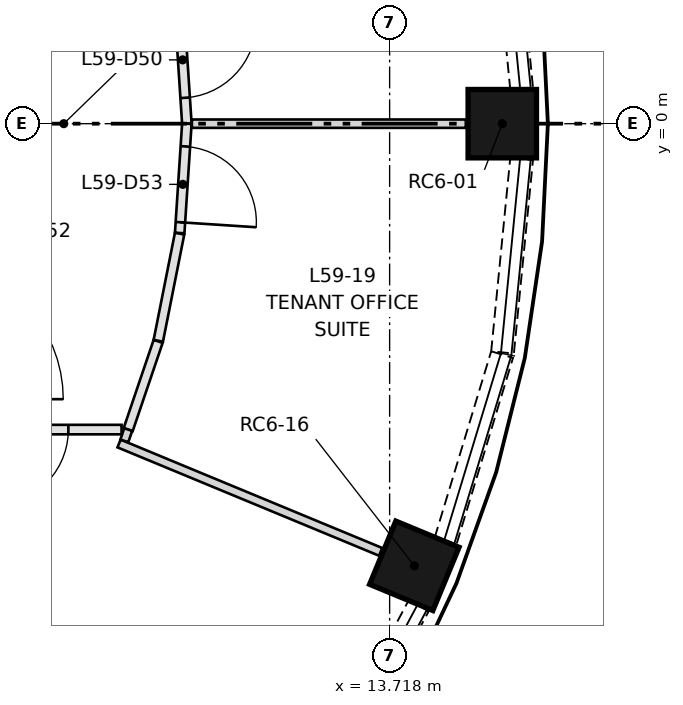
"""IFC4 building model, lengths in metres.
Left out: names, types, materials, properties, quantities, classifications, styles, units other than length and angle.
Written with IfcOpenShell. Run it as: python <this file> out.ifc"""

import sys

from ifc_helpers import new_model, si_unit, direction, frame, frame_2d, origin, origin_2d, place, context, subcontext, project, spatial, rectangle, extrude, element, fill, save


model = new_model("IFC4")
c1 = context("Model", 3, precision=1e-05, world=origin(), true_north=direction((0.0, 1.0)))
c2 = subcontext(c1, "Body", "Model", "MODEL_VIEW")
j1 = project(units=[si_unit("LENGTHUNIT", "METRE"), si_unit("PLANEANGLEUNIT", "RADIAN")], contexts=[c1])
p1 = place(None, origin())
s1 = spatial("IfcSite", under=j1, at=p1, CompositionType="ELEMENT")
p2 = place(p1, origin())
s2 = spatial("IfcBuilding", under=s1, at=p2, CompositionType="ELEMENT")
p3 = place(p2, frame((0.0, 0.0, 217.8)))
s3 = spatial("IfcBuildingStorey", under=s2, at=p3, CompositionType="ELEMENT", Elevation=217.8)
for number, where, z_axis, x_axis in (
    (1, (15.2, 0.0, 0.5), (0.0, 0.0, 1.0), (1.0, 0.0, 0.0)),
    (2, (14.043, -5.817, 0.5), (0.0, 0.0, 1.0), (0.924, -0.383, 0.0)),
):
    element("IfcColumn", number, at=place(p3, frame(where, z_axis=z_axis, x_axis=x_axis)), inside=s3, PredefinedType="COLUMN", context=c2, shape_type="SweptSolid", body=[
        extrude(rectangle(XDim=0.9, YDim=0.9, at=origin_2d()), origin(), (0.0, 0.0, 1.0), 2.85),
    ])
p4 = place(p3, frame((15.455, 0.464, 0.0), z_axis=(0.0, 0.0, 1.0), x_axis=(-0.09813315545, 0.995173293352, 0.0)))
e3 = element("IfcWall", 3, at=p4, inside=s3, PredefinedType="SOLIDWALL", context=c2, shape_type="SweptSolid", body=[
    extrude(rectangle(XDim=2.558, YDim=0.3, at=frame_2d((1.279, 0.0))), origin(), (0.0, 0.0, 1.0), 0.9),
])
p5 = place(p3, frame((12.894, -8.598, 0.0), z_axis=(0.0, 0.0, 1.0), x_axis=(0.471603904468, 0.881810499649, 0.0)))
e4 = element("IfcWall", 4, at=p5, inside=s3, PredefinedType="SOLIDWALL", context=c2, shape_type="SweptSolid", body=[
    extrude(rectangle(XDim=2.557, YDim=0.3, at=frame_2d((1.278, 0.0))), origin(), (0.0, 0.0, 1.0), 0.9),
])
p6 = place(p3, frame((14.455, -5.486, 0.0), z_axis=(0.0, 0.0, 1.0), x_axis=(0.290219358397, 0.956960147557, 0.0)))
e5 = element("IfcWall", 5, at=p6, inside=s3, PredefinedType="SOLIDWALL", context=c2, shape_type="SweptSolid", body=[
    extrude(rectangle(XDim=2.557, YDim=0.3, at=frame_2d((1.279, 0.0))), origin(), (0.0, 0.0, 1.0), 0.9),
])
p7 = place(p3, frame((15.204, -3.009, 0.0), z_axis=(0.0, 0.0, 1.0), x_axis=(0.09813315545, 0.995173293352, 0.0)))
e6 = element("IfcWall", 6, at=p7, inside=s3, PredefinedType="SOLIDWALL", context=c2, shape_type="SweptSolid", body=[
    extrude(rectangle(XDim=2.558, YDim=0.3, at=frame_2d((1.279, 0.0))), origin(), (0.0, 0.0, 1.0), 0.9),
])
p8 = place(p3, frame((10.956, 1.438, 0.0), z_axis=(0.0, 0.0, 1.0), x_axis=(0.065383473363, -0.997860211358, 0.0)))
e7 = element("IfcWall", 7, at=p8, inside=s3, PredefinedType="PARTITIONING", context=c2, shape_type="SweptSolid", body=[
    extrude(rectangle(XDim=1.441, YDim=0.125, at=frame_2d((0.721, 0.0))), origin(), (0.0, 0.0, 1.0), 3.0),
])
p9 = place(p8, frame((0.1, 0.0, 0.0)))
e8 = element("IfcOpeningElement", 8, at=p9, cuts=e7, PredefinedType="OPENING", context=c2, shape_type="SweptSolid", body=[
    extrude(rectangle(XDim=1.0, YDim=2.1, at=frame_2d((0.5, 1.05))), frame((0.0, 0.073, 0.0), z_axis=(0.0, -1.0, 0.0), x_axis=(1.0, 0.0, 0.0)), (0.0, 0.0, 1.0), 0.145),
])
p10 = place(p3, frame((10.191, -4.024, 0.0), z_axis=(0.0, 0.0, 1.0), x_axis=(-1.0, 0.0, 0.0)))
e9 = element("IfcWall", 9, at=p10, inside=s3, PredefinedType="PARTITIONING", context=c2, shape_type="SweptSolid", body=[
    extrude(rectangle(XDim=2.317, YDim=0.125, at=frame_2d((1.158, 0.0))), origin(), (0.0, 0.0, 1.0), 3.0),
])
p11 = place(p10, frame((0.7, 0.0, 0.0)))
e10 = element("IfcOpeningElement", 10, at=p11, cuts=e9, PredefinedType="OPENING", context=c2, shape_type="SweptSolid", body=[
    extrude(rectangle(XDim=1.0, YDim=2.1, at=frame_2d((0.5, 1.05))), frame((0.0, 0.073, 0.0), z_axis=(0.0, -1.0, 0.0), x_axis=(1.0, 0.0, 0.0)), (0.0, 0.0, 1.0), 0.145),
])
p12 = place(p3, frame((10.672, -2.864, 0.0), z_axis=(0.0, 0.0, 1.0), x_axis=(-0.321363343769, -0.946955965862, 0.0)))
e11 = element("IfcWall", 11, at=p12, inside=s3, PredefinedType="PARTITIONING", context=c2, shape_type="SweptSolid", body=[
    extrude(rectangle(XDim=1.225, YDim=0.125, at=frame_2d((0.613, 0.0))), origin(), (0.0, 0.0, 1.0), 3.0),
])
p13 = place(p3, frame((10.955, -1.446, 0.0), z_axis=(0.0, 0.0, 1.0), x_axis=(-0.195005351681, -0.980802178228, 0.0)))
e12 = element("IfcWall", 12, at=p13, inside=s3, PredefinedType="PARTITIONING", context=c2, shape_type="SweptSolid", body=[
    extrude(rectangle(XDim=1.437, YDim=0.125, at=frame_2d((0.719, 0.0))), origin(), (0.0, 0.0, 1.0), 3.0),
])
p14 = place(p3, frame((11.05, 0.0, 0.0), z_axis=(0.0, 0.0, 1.0), x_axis=(-0.065383473363, -0.997860211358, 0.0)))
e13 = element("IfcWall", 13, at=p14, inside=s3, PredefinedType="PARTITIONING", context=c2, shape_type="SweptSolid", body=[
    extrude(rectangle(XDim=1.441, YDim=0.125, at=frame_2d((0.721, 0.0))), origin(), (0.0, 0.0, 1.0), 3.0),
])
p15 = place(p14, frame((0.3, 0.0, 0.0)))
e14 = element("IfcOpeningElement", 14, at=p15, cuts=e13, PredefinedType="OPENING", context=c2, shape_type="SweptSolid", body=[
    extrude(rectangle(XDim=1.0, YDim=2.1, at=frame_2d((0.5, 1.05))), frame((0.0, 0.073, 0.0), z_axis=(0.0, -1.0, 0.0), x_axis=(1.0, 0.0, 0.0)), (0.0, 0.0, 1.0), 0.145),
])
p16 = place(p3, frame((14.72, 0.0, 0.0), z_axis=(0.0, 0.0, 1.0), x_axis=(-1.0, 0.0, 0.0)))
e15 = element("IfcWall", 15, at=p16, inside=s3, PredefinedType="PARTITIONING", context=c2, shape_type="SweptSolid", body=[
    extrude(rectangle(XDim=3.604, YDim=0.11, at=frame_2d((1.802, 0.0))), origin(), (0.0, 0.0, 1.0), 3.0),
])
p17 = place(p3, frame((10.158, -4.208, 0.0), z_axis=(0.0, 0.0, 1.0), x_axis=(0.923897012701, -0.382641228728, 0.0)))
e16 = element("IfcWall", 16, at=p17, inside=s3, PredefinedType="PARTITIONING", context=c2, shape_type="SweptSolid", body=[
    extrude(rectangle(XDim=3.725, YDim=0.11, at=frame_2d((1.862, 0.0))), origin(), (0.0, 0.0, 1.0), 3.0),
])
p18 = place(p3, frame((10.278, -4.024, 0.0), z_axis=(0.0, 0.0, 1.0), x_axis=(-0.321819116975, -0.94680117023, 0.0)))
e17 = element("IfcWall", 17, at=p18, inside=s3, PredefinedType="PARTITIONING", context=c2, shape_type="SweptSolid", body=[
    extrude(rectangle(XDim=0.157, YDim=0.11, at=frame_2d((0.079, 0.0))), origin(), (0.0, 0.0, 1.0), 3.0),
])
p19 = place(p9, origin())
e18 = element("IfcDoor", 18, at=p19, inside=s3, OperationType="SINGLE_SWING_LEFT", PredefinedType="DOOR", context=c2, shape_type="SweptSolid", body=[
    extrude(rectangle(XDim=1.0, YDim=2.1, at=frame_2d((0.5, 1.05))), frame((0.0, 0.025, 0.0), z_axis=(0.0, -1.0, 0.0), x_axis=(1.0, 0.0, 0.0)), (0.0, 0.0, 1.0), 0.05),
])
fill(e8, e18)
p20 = place(p11, origin())
e19 = element("IfcDoor", 19, at=p20, inside=s3, OperationType="SINGLE_SWING_RIGHT", PredefinedType="DOOR", context=c2, shape_type="SweptSolid", body=[
    extrude(rectangle(XDim=1.0, YDim=2.1, at=frame_2d((0.5, 1.05))), frame((0.0, 0.025, 0.0), z_axis=(0.0, -1.0, 0.0), x_axis=(1.0, 0.0, 0.0)), (0.0, 0.0, 1.0), 0.05),
])
fill(e10, e19)
p21 = place(p15, origin())
e20 = element("IfcDoor", 20, at=p21, inside=s3, OperationType="SINGLE_SWING_RIGHT", PredefinedType="DOOR", context=c2, shape_type="SweptSolid", body=[
    extrude(rectangle(XDim=1.0, YDim=2.1, at=frame_2d((0.5, 1.05))), frame((0.0, 0.025, 0.0), z_axis=(0.0, -1.0, 0.0), x_axis=(1.0, 0.0, 0.0)), (0.0, 0.0, 1.0), 0.05),
])
fill(e14, e20)
save(model, sys.argv[1])
